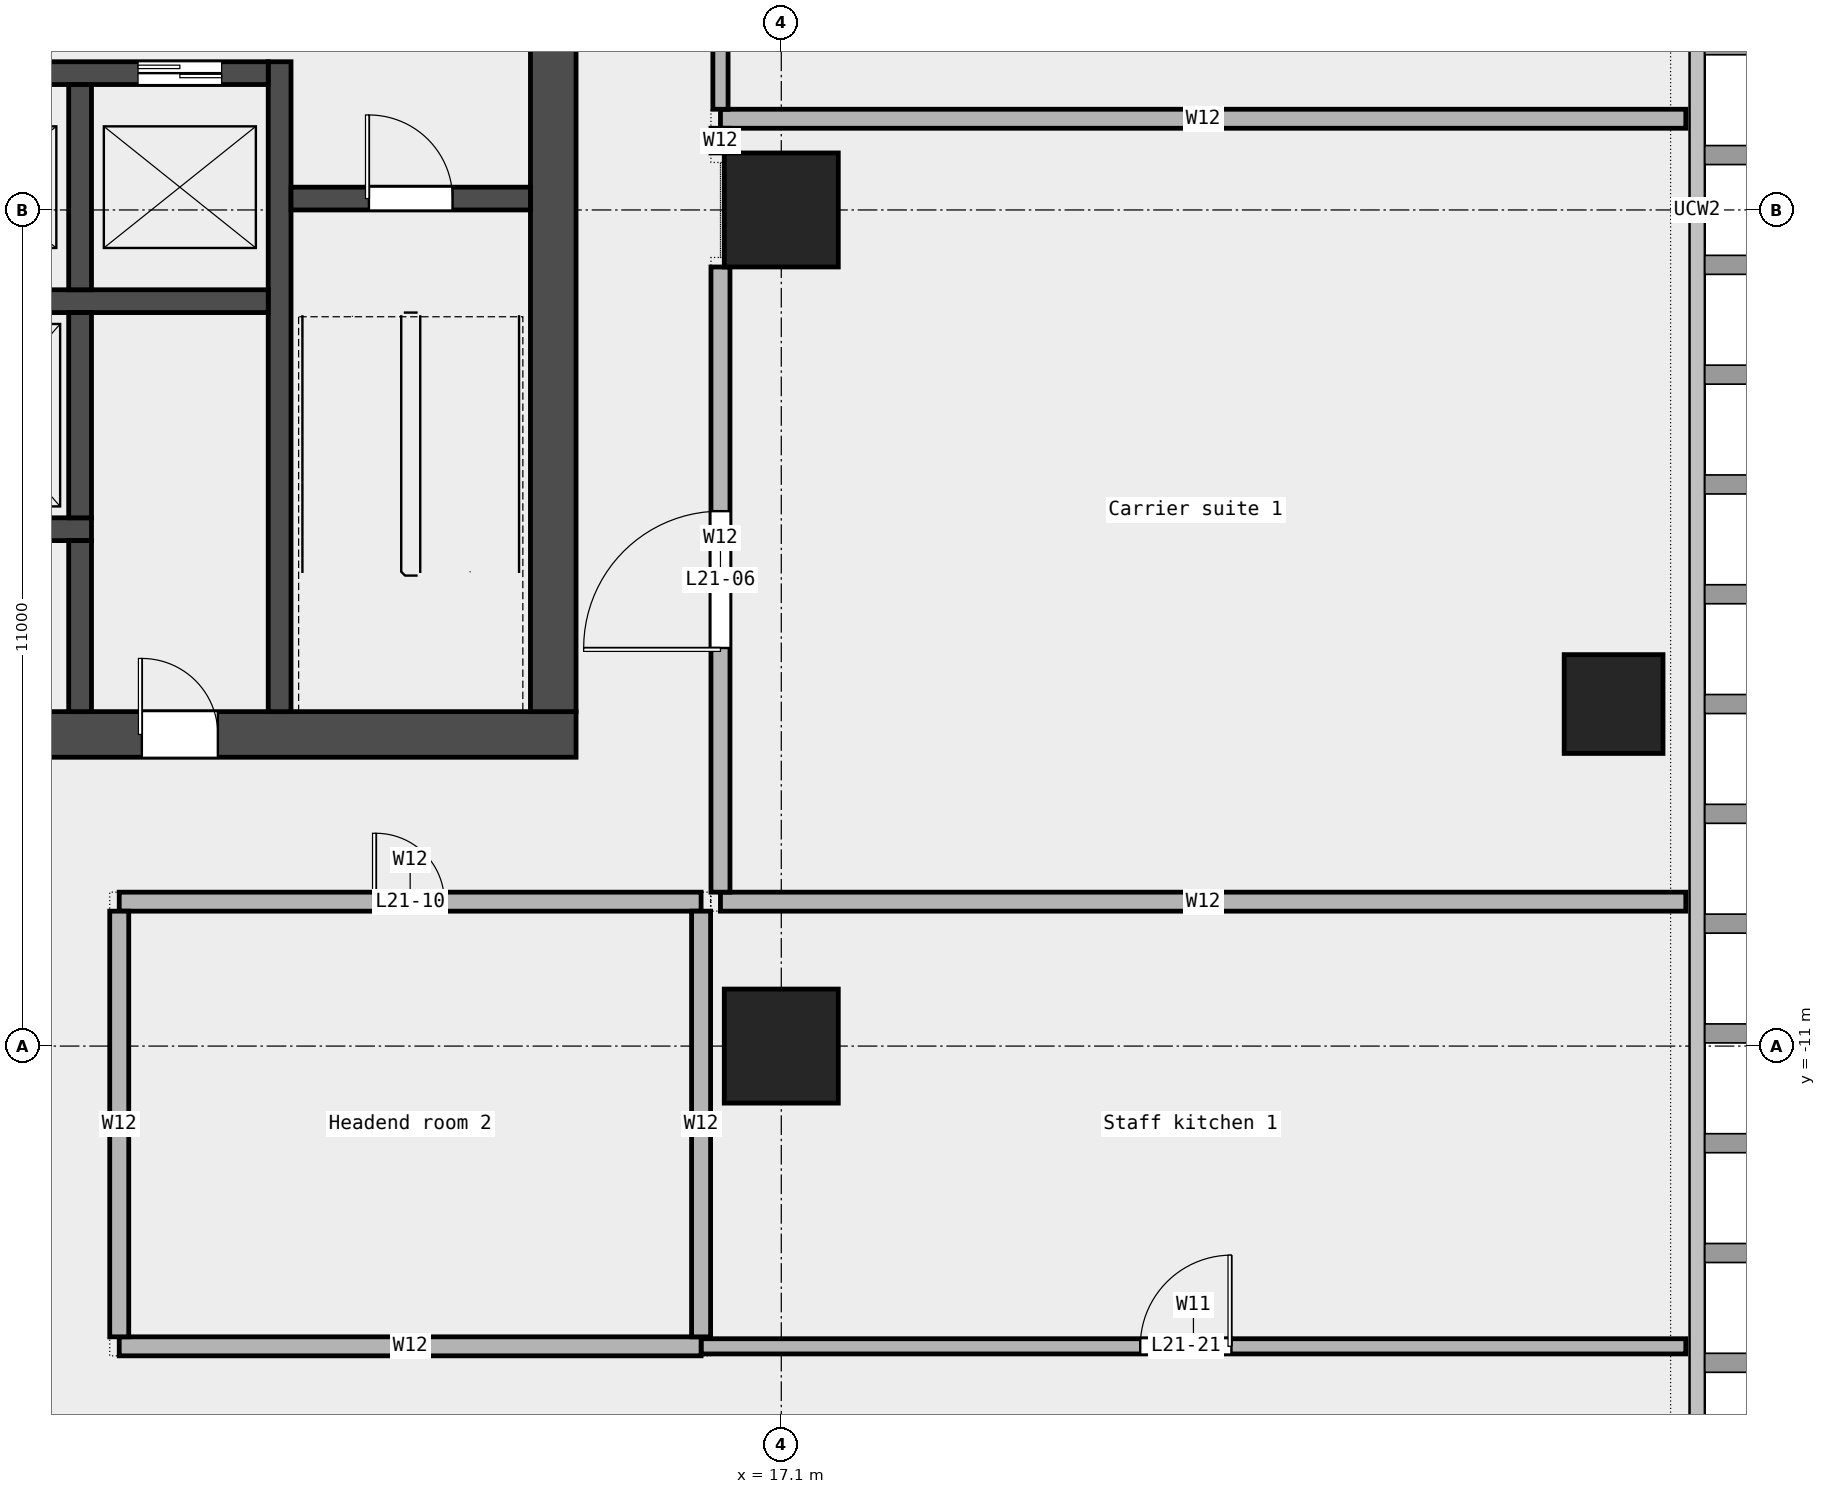
"""IFC4 building model, lengths in metres.
Left out: names, types, materials, properties, quantities, classifications, styles, units other than length and angle.
Written with IfcOpenShell. Run it as: python <this file> out.ifc"""

import sys

from ifc_helpers import new_model, si_unit, direction, frame, frame_2d, origin, origin_2d, place, context, subcontext, project, spatial, rectangle, extrude, element, fill, save


model = new_model("IFC4")
c1 = context("Model", 3, precision=1e-05, world=origin(), true_north=direction((0.0, 1.0)))
c2 = subcontext(c1, "Body", "Model", "MODEL_VIEW")
j1 = project(units=[si_unit("LENGTHUNIT", "METRE"), si_unit("PLANEANGLEUNIT", "RADIAN")], contexts=[c1])
p1 = place(None, origin())
s1 = spatial("IfcSite", under=j1, at=p1, CompositionType="ELEMENT")
p2 = place(p1, origin())
s2 = spatial("IfcBuilding", under=s1, at=p2, CompositionType="ELEMENT")
p3 = place(p2, frame((0.0, 0.0, 108.1)))
s3 = spatial("IfcBuildingStorey", under=s2, at=p3, CompositionType="ELEMENT", Elevation=108.1)
p4 = place(p3, frame((28.05, -6.5, 0.0), z_axis=(0.0, 0.0, 1.0), x_axis=(1.0, 0.0, 0.0)))
e1 = element("IfcColumn", 1, at=p4, inside=s3, PredefinedType="COLUMN", context=c2, shape_type="SweptSolid", body=[
    extrude(rectangle(XDim=1.3, YDim=1.3, at=origin_2d()), origin(), (0.0, 0.0, 1.0), 4.05),
])
for number, where, z_axis, x_axis in (
    (2, (17.1, -11.0, 0.0), (0.0, 0.0, 1.0), (1.0, 0.0, 0.0)),
    (3, (17.1, 0.0, 0.0), (0.0, 0.0, 1.0), (1.0, 0.0, 0.0)),
):
    element("IfcColumn", number, at=place(p3, frame(where, z_axis=z_axis, x_axis=x_axis)), inside=s3, PredefinedType="COLUMN", context=c2, shape_type="SweptSolid", body=[
        extrude(rectangle(XDim=1.5, YDim=1.5, at=origin_2d()), origin(), (0.0, 0.0, 1.0), 4.05),
    ])
p5 = place(p3, frame((16.045, -14.95, 0.0), z_axis=(0.0, 0.0, 1.0), x_axis=(1.0, 0.0, 0.0)))
e4 = element("IfcWall", 4, at=p5, inside=s3, PredefinedType="PARTITIONING", context=c2, shape_type="SweptSolid", body=[
    extrude(rectangle(XDim=12.955, YDim=0.2, at=frame_2d((6.478, 0.0))), origin(), (0.0, 0.0, 1.0), 4.05),
])
p6 = place(p5, frame((5.778, 0.0, 0.0)))
e5 = element("IfcOpeningElement", 5, at=p6, cuts=e4, PredefinedType="OPENING", context=c2, shape_type="SweptSolid", body=[
    extrude(rectangle(XDim=1.2, YDim=2.1, at=frame_2d((0.6, 1.05))), frame((0.0, 0.112, 0.0), z_axis=(0.0, -1.0, 0.0), x_axis=(1.0, 0.0, 0.0)), (0.0, 0.0, 1.0), 0.224),
])
p7 = place(p3, frame((8.39, -14.95, 0.0), z_axis=(0.0, 0.0, 1.0), x_axis=(1.0, 0.0, 0.0)))
e6 = element("IfcWall", 6, at=p7, inside=s3, PredefinedType="PARTITIONING", context=c2, shape_type="SweptSolid", body=[
    extrude(rectangle(XDim=7.655, YDim=0.25, at=frame_2d((3.828, 0.0))), origin(), (0.0, 0.0, 1.0), 4.05),
])
p8 = place(p3, frame((8.39, -9.1, 0.0), z_axis=(0.0, 0.0, 1.0), x_axis=(1.0, 0.0, 0.0)))
e7 = element("IfcWall", 7, at=p8, inside=s3, PredefinedType="PARTITIONING", context=c2, shape_type="SweptSolid", body=[
    extrude(rectangle(XDim=7.655, YDim=0.25, at=frame_2d((3.828, 0.0))), origin(), (0.0, 0.0, 1.0), 4.05),
])
p9 = place(p8, frame((3.377, 0.0, 0.0)))
e8 = element("IfcOpeningElement", 8, at=p9, cuts=e7, PredefinedType="OPENING", context=c2, shape_type="SweptSolid", body=[
    extrude(rectangle(XDim=0.9, YDim=2.1, at=frame_2d((0.45, 1.05))), frame((0.0, 0.137, 0.0), z_axis=(0.0, -1.0, 0.0), x_axis=(1.0, 0.0, 0.0)), (0.0, 0.0, 1.0), 0.274),
])
for number, where, z_axis, x_axis in (
    (9, (16.3, -9.1, 0.0), (0.0, 0.0, 1.0), (1.0, 0.0, 0.0)),
    (10, (16.3, 1.2, 0.0), (0.0, 0.0, 1.0), (1.0, 0.0, 0.0)),
):
    element("IfcWall", number, at=place(p3, frame(where, z_axis=z_axis, x_axis=x_axis)), inside=s3, PredefinedType="PARTITIONING", context=c2, shape_type="SweptSolid", body=[
        extrude(rectangle(XDim=12.7, YDim=0.25, at=frame_2d((6.35, 0.0))), origin(), (0.0, 0.0, 1.0), 4.05),
    ])
for number, where, z_axis, x_axis in (
    (11, (8.39, -14.825, 0.0), (0.0, 0.0, 1.0), (0.0, 1.0, 0.0)),
    (12, (16.045, -14.825, 0.0), (0.0, 0.0, 1.0), (0.0, 1.0, 0.0)),
):
    element("IfcWall", number, at=place(p3, frame(where, z_axis=z_axis, x_axis=x_axis)), inside=s3, PredefinedType="PARTITIONING", context=c2, shape_type="SweptSolid", body=[
        extrude(rectangle(XDim=5.6, YDim=0.25, at=frame_2d((2.8, 0.0))), origin(), (0.0, 0.0, 1.0), 4.05),
    ])
p10 = place(p3, frame((16.3, 1.325, 0.0), z_axis=(0.0, 0.0, 1.0), x_axis=(0.0, 1.0, 0.0)))
e13 = element("IfcWall", 13, at=p10, inside=s3, PredefinedType="PARTITIONING", context=c2, shape_type="SweptSolid", body=[
    extrude(rectangle(XDim=8.925, YDim=0.2, at=frame_2d((4.462, 0.0))), origin(), (0.0, 0.0, 1.0), 4.05),
])
p11 = place(p10, frame((3.188, 0.0, 0.0)))
e14 = element("IfcOpeningElement", 14, at=p11, cuts=e13, PredefinedType="OPENING", context=c2, shape_type="SweptSolid", body=[
    extrude(rectangle(XDim=1.8, YDim=2.1, at=frame_2d((0.9, 1.05))), frame((0.0, 0.112, 0.0), z_axis=(0.0, -1.0, 0.0), x_axis=(1.0, 0.0, 0.0)), (0.0, 0.0, 1.0), 0.224),
])
p12 = place(p3, frame((16.3, -8.975, 0.0), z_axis=(0.0, 0.0, 1.0), x_axis=(0.0, 1.0, 0.0)))
e15 = element("IfcWall", 15, at=p12, inside=s3, PredefinedType="PARTITIONING", context=c2, shape_type="SweptSolid", body=[
    extrude(rectangle(XDim=8.225, YDim=0.25, at=frame_2d((4.113, 0.0))), origin(), (0.0, 0.0, 1.0), 4.05),
])
p13 = place(p12, frame((3.212, 0.0, 0.0)))
e16 = element("IfcOpeningElement", 16, at=p13, cuts=e15, PredefinedType="OPENING", context=c2, shape_type="SweptSolid", body=[
    extrude(rectangle(XDim=1.8, YDim=2.1, at=frame_2d((0.9, 1.05))), frame((0.0, 0.137, 0.0), z_axis=(0.0, -1.0, 0.0), x_axis=(1.0, 0.0, 0.0)), (0.0, 0.0, 1.0), 0.274),
])
p14 = place(p3, frame((16.3, 0.75, 0.0), z_axis=(0.0, 0.0, 1.0), x_axis=(0.0, 1.0, 0.0)))
e17 = element("IfcWall", 17, at=p14, inside=s3, PredefinedType="PARTITIONING", context=c2, shape_type="SweptSolid", body=[
    extrude(rectangle(XDim=0.325, YDim=0.25, at=frame_2d((0.163, 0.0))), origin(), (0.0, 0.0, 1.0), 4.05),
])
p15 = place(p3, frame((-14.4, -6.9, 0.0), z_axis=(0.0, 0.0, 1.0), x_axis=(1.0, 0.0, 0.0)))
e18 = element("IfcWall", 18, at=p15, inside=s3, PredefinedType="SHEAR", context=c2, shape_type="SweptSolid", body=[
    extrude(rectangle(XDim=28.8, YDim=0.6, at=frame_2d((14.4, 0.0))), origin(), (0.0, 0.0, 1.0), 4.2),
])
p16 = place(p15, frame((7.05, 0.0, 0.0)))
e19 = element("IfcOpeningElement", 19, at=p16, cuts=e18, PredefinedType="OPENING", context=c2, shape_type="SweptSolid", body=[
    extrude(rectangle(XDim=1.2, YDim=2.1, at=frame_2d((0.6, 1.05))), frame((0.0, 0.312, 0.0), z_axis=(0.0, -1.0, 0.0), x_axis=(1.0, 0.0, 0.0)), (0.0, 0.0, 1.0), 0.624),
])
p17 = place(p15, frame((11.837, 0.0, 0.0)))
e20 = element("IfcOpeningElement", 20, at=p17, cuts=e18, PredefinedType="OPENING", context=c2, shape_type="SweptSolid", body=[
    extrude(rectangle(XDim=1.0, YDim=2.1, at=frame_2d((0.5, 1.05))), frame((0.0, 0.312, 0.0), z_axis=(0.0, -1.0, 0.0), x_axis=(1.0, 0.0, 0.0)), (0.0, 0.0, 1.0), 0.624),
])
p18 = place(p15, frame((13.712, 0.0, 0.0)))
e21 = element("IfcOpeningElement", 21, at=p18, cuts=e18, PredefinedType="OPENING", context=c2, shape_type="SweptSolid", body=[
    extrude(rectangle(XDim=1.0, YDim=2.1, at=frame_2d((0.5, 1.05))), frame((0.0, 0.312, 0.0), z_axis=(0.0, -1.0, 0.0), x_axis=(1.0, 0.0, 0.0)), (0.0, 0.0, 1.0), 0.624),
])
p19 = place(p15, frame((15.587, 0.0, 0.0)))
e22 = element("IfcOpeningElement", 22, at=p19, cuts=e18, PredefinedType="OPENING", context=c2, shape_type="SweptSolid", body=[
    extrude(rectangle(XDim=1.0, YDim=2.1, at=frame_2d((0.5, 1.05))), frame((0.0, 0.312, 0.0), z_axis=(0.0, -1.0, 0.0), x_axis=(1.0, 0.0, 0.0)), (0.0, 0.0, 1.0), 0.624),
])
p20 = place(p15, frame((18.75, 0.0, 0.0)))
e23 = element("IfcOpeningElement", 23, at=p20, cuts=e18, PredefinedType="OPENING", context=c2, shape_type="SweptSolid", body=[
    extrude(rectangle(XDim=1.8, YDim=2.1, at=frame_2d((0.9, 1.05))), frame((0.0, 0.312, 0.0), z_axis=(0.0, -1.0, 0.0), x_axis=(1.0, 0.0, 0.0)), (0.0, 0.0, 1.0), 0.624),
])
p21 = place(p15, frame((23.087, 0.0, 0.0)))
e24 = element("IfcOpeningElement", 24, at=p21, cuts=e18, PredefinedType="OPENING", context=c2, shape_type="SweptSolid", body=[
    extrude(rectangle(XDim=1.0, YDim=2.1, at=frame_2d((0.5, 1.05))), frame((0.0, 0.312, 0.0), z_axis=(0.0, -1.0, 0.0), x_axis=(1.0, 0.0, 0.0)), (0.0, 0.0, 1.0), 0.624),
])
p22 = place(p3, frame((14.1, -6.6, 0.0), z_axis=(0.0, 0.0, 1.0), x_axis=(0.0, 1.0, 0.0)))
e25 = element("IfcWall", 25, at=p22, inside=s3, PredefinedType="SHEAR", context=c2, shape_type="SweptSolid", body=[
    extrude(rectangle(XDim=19.5, YDim=0.6, at=frame_2d((9.75, 0.0))), origin(), (0.0, 0.0, 1.0), 4.2),
])
p23 = place(p22, frame((9.3, 0.0, 0.0)))
e26 = element("IfcOpeningElement", 26, at=p23, cuts=e25, PredefinedType="OPENING", context=c2, shape_type="SweptSolid", body=[
    extrude(rectangle(XDim=1.8, YDim=2.1, at=frame_2d((0.9, 1.05))), frame((0.0, 0.312, 0.0), z_axis=(0.0, -1.0, 0.0), x_axis=(1.0, 0.0, 0.0)), (0.0, 0.0, 1.0), 0.624),
])
p24 = place(p3, frame((10.5, -6.6, 0.0), z_axis=(0.0, 0.0, 1.0), x_axis=(0.0, 1.0, 0.0)))
e27 = element("IfcWall", 27, at=p24, inside=s3, PredefinedType="SHEAR", context=c2, shape_type="SweptSolid", body=[
    extrude(rectangle(XDim=8.55, YDim=0.3, at=frame_2d((4.275, 0.0))), origin(), (0.0, 0.0, 1.0), 4.2),
])
p25 = place(p3, frame((10.65, 0.15, 0.0), z_axis=(0.0, 0.0, 1.0), x_axis=(1.0, 0.0, 0.0)))
e28 = element("IfcWall", 28, at=p25, inside=s3, PredefinedType="SOLIDWALL", context=c2, shape_type="SweptSolid", body=[
    extrude(rectangle(XDim=3.15, YDim=0.3, at=frame_2d((1.575, 0.0))), origin(), (0.0, 0.0, 1.0), 4.2),
])
p26 = place(p25, frame((1.025, 0.0, 0.0)))
e29 = element("IfcOpeningElement", 29, at=p26, cuts=e28, PredefinedType="OPENING", context=c2, shape_type="SweptSolid", body=[
    extrude(rectangle(XDim=1.1, YDim=2.1, at=frame_2d((0.55, 1.05))), frame((0.0, 0.162, 0.0), z_axis=(0.0, -1.0, 0.0), x_axis=(1.0, 0.0, 0.0)), (0.0, 0.0, 1.0), 0.324),
])
p27 = place(p3, frame((-10.35, -1.2, 0.0), z_axis=(0.0, 0.0, 1.0), x_axis=(1.0, 0.0, 0.0)))
e30 = element("IfcWall", 30, at=p27, inside=s3, PredefinedType="SOLIDWALL", context=c2, shape_type="SweptSolid", body=[
    extrude(rectangle(XDim=20.7, YDim=0.3, at=frame_2d((10.35, 0.0))), origin(), (0.0, 0.0, 1.0), 4.2),
])
p28 = place(p3, frame((-10.35, 1.8, 0.0), z_axis=(0.0, 0.0, 1.0), x_axis=(1.0, 0.0, 0.0)))
e31 = element("IfcWall", 31, at=p28, inside=s3, PredefinedType="SOLIDWALL", context=c2, shape_type="SweptSolid", body=[
    extrude(rectangle(XDim=20.7, YDim=0.3, at=frame_2d((10.35, 0.0))), origin(), (0.0, 0.0, 1.0), 4.2),
])
p29 = place(p28, frame((0.512, 0.0, 0.0)))
e32 = element("IfcOpeningElement", 32, at=p29, cuts=e31, PredefinedType="OPENING", context=c2, shape_type="SweptSolid", body=[
    extrude(rectangle(XDim=1.3, YDim=2.1, at=frame_2d((0.65, 1.05))), frame((0.0, 0.162, 0.0), z_axis=(0.0, -1.0, 0.0), x_axis=(1.0, 0.0, 0.0)), (0.0, 0.0, 1.0), 0.324),
])
p30 = place(p28, frame((5.863, 0.0, 0.0)))
e33 = element("IfcOpeningElement", 33, at=p30, cuts=e31, PredefinedType="OPENING", context=c2, shape_type="SweptSolid", body=[
    extrude(rectangle(XDim=1.1, YDim=2.1, at=frame_2d((0.55, 1.05))), frame((0.0, 0.162, 0.0), z_axis=(0.0, -1.0, 0.0), x_axis=(1.0, 0.0, 0.0)), (0.0, 0.0, 1.0), 0.324),
])
p31 = place(p28, frame((8.488, 0.0, 0.0)))
e34 = element("IfcOpeningElement", 34, at=p31, cuts=e31, PredefinedType="OPENING", context=c2, shape_type="SweptSolid", body=[
    extrude(rectangle(XDim=1.1, YDim=2.1, at=frame_2d((0.55, 1.05))), frame((0.0, 0.162, 0.0), z_axis=(0.0, -1.0, 0.0), x_axis=(1.0, 0.0, 0.0)), (0.0, 0.0, 1.0), 0.324),
])
p32 = place(p28, frame((11.113, 0.0, 0.0)))
e35 = element("IfcOpeningElement", 35, at=p32, cuts=e31, PredefinedType="OPENING", context=c2, shape_type="SweptSolid", body=[
    extrude(rectangle(XDim=1.1, YDim=2.1, at=frame_2d((0.55, 1.05))), frame((0.0, 0.162, 0.0), z_axis=(0.0, -1.0, 0.0), x_axis=(1.0, 0.0, 0.0)), (0.0, 0.0, 1.0), 0.324),
])
p33 = place(p28, frame((13.738, 0.0, 0.0)))
e36 = element("IfcOpeningElement", 36, at=p33, cuts=e31, PredefinedType="OPENING", context=c2, shape_type="SweptSolid", body=[
    extrude(rectangle(XDim=1.1, YDim=2.1, at=frame_2d((0.55, 1.05))), frame((0.0, 0.162, 0.0), z_axis=(0.0, -1.0, 0.0), x_axis=(1.0, 0.0, 0.0)), (0.0, 0.0, 1.0), 0.324),
])
p34 = place(p28, frame((16.363, 0.0, 0.0)))
e37 = element("IfcOpeningElement", 37, at=p34, cuts=e31, PredefinedType="OPENING", context=c2, shape_type="SweptSolid", body=[
    extrude(rectangle(XDim=1.1, YDim=2.1, at=frame_2d((0.55, 1.05))), frame((0.0, 0.162, 0.0), z_axis=(0.0, -1.0, 0.0), x_axis=(1.0, 0.0, 0.0)), (0.0, 0.0, 1.0), 0.324),
])
p35 = place(p28, frame((18.988, 0.0, 0.0)))
e38 = element("IfcOpeningElement", 38, at=p35, cuts=e31, PredefinedType="OPENING", context=c2, shape_type="SweptSolid", body=[
    extrude(rectangle(XDim=1.1, YDim=2.1, at=frame_2d((0.55, 1.05))), frame((0.0, 0.162, 0.0), z_axis=(0.0, -1.0, 0.0), x_axis=(1.0, 0.0, 0.0)), (0.0, 0.0, 1.0), 0.324),
])
p36 = place(p3, frame((7.875, -1.05, 0.0), z_axis=(0.0, 0.0, 1.0), x_axis=(0.0, 1.0, 0.0)))
e39 = element("IfcWall", 39, at=p36, inside=s3, PredefinedType="SOLIDWALL", context=c2, shape_type="SweptSolid", body=[
    extrude(rectangle(XDim=2.7, YDim=0.3, at=frame_2d((1.35, 0.0))), origin(), (0.0, 0.0, 1.0), 4.2),
])
p37 = place(p3, frame((2.475, -4.2, 0.0), z_axis=(0.0, 0.0, 1.0), x_axis=(1.0, 0.0, 0.0)))
e40 = element("IfcWall", 40, at=p37, inside=s3, PredefinedType="SOLIDWALL", context=c2, shape_type="SweptSolid", body=[
    extrude(rectangle(XDim=5.55, YDim=0.3, at=frame_2d((2.775, 0.0))), origin(), (0.0, 0.0, 1.0), 4.2),
])
p38 = place(p37, frame((0.762, 0.0, 0.0)))
e41 = element("IfcOpeningElement", 41, at=p38, cuts=e40, PredefinedType="OPENING", context=c2, shape_type="SweptSolid", body=[
    extrude(rectangle(XDim=1.4, YDim=2.1, at=frame_2d((0.7, 1.05))), frame((0.0, 0.162, 0.0), z_axis=(0.0, -1.0, 0.0), x_axis=(1.0, 0.0, 0.0)), (0.0, 0.0, 1.0), 0.324),
])
p39 = place(p37, frame((3.387, 0.0, 0.0)))
e42 = element("IfcOpeningElement", 42, at=p39, cuts=e40, PredefinedType="OPENING", context=c2, shape_type="SweptSolid", body=[
    extrude(rectangle(XDim=1.4, YDim=2.1, at=frame_2d((0.7, 1.05))), frame((0.0, 0.162, 0.0), z_axis=(0.0, -1.0, 0.0), x_axis=(1.0, 0.0, 0.0)), (0.0, 0.0, 1.0), 0.324),
])
p40 = place(p3, frame((7.875, -4.05, 0.0), z_axis=(0.0, 0.0, 1.0), x_axis=(0.0, 1.0, 0.0)))
e43 = element("IfcWall", 43, at=p40, inside=s3, PredefinedType="SOLIDWALL", context=c2, shape_type="SweptSolid", body=[
    extrude(rectangle(XDim=2.7, YDim=0.3, at=frame_2d((1.35, 0.0))), origin(), (0.0, 0.0, 1.0), 4.2),
])
p41 = place(p3, frame((7.875, -6.6, 0.0), z_axis=(0.0, 0.0, 1.0), x_axis=(0.0, 1.0, 0.0)))
e44 = element("IfcWall", 44, at=p41, inside=s3, PredefinedType="SOLIDWALL", context=c2, shape_type="SweptSolid", body=[
    extrude(rectangle(XDim=2.25, YDim=0.3, at=frame_2d((1.125, 0.0))), origin(), (0.0, 0.0, 1.0), 4.2),
])
p42 = place(p13, origin())
e45 = element("IfcDoor", 45, at=p42, inside=s3, OperationType="DOUBLE_DOOR_SINGLE_SWING", PredefinedType="DOOR", context=c2, shape_type="SweptSolid", body=[
    extrude(rectangle(XDim=1.8, YDim=2.1, at=frame_2d((0.9, 1.05))), frame((0.0, 0.025, 0.0), z_axis=(0.0, -1.0, 0.0), x_axis=(1.0, 0.0, 0.0)), (0.0, 0.0, 1.0), 0.05),
])
fill(e16, e45)
p43 = place(p9, origin())
e46 = element("IfcDoor", 46, at=p43, inside=s3, OperationType="SINGLE_SWING_LEFT", PredefinedType="DOOR", context=c2, shape_type="SweptSolid", body=[
    extrude(rectangle(XDim=0.9, YDim=2.1, at=frame_2d((0.45, 1.05))), frame((0.0, 0.025, 0.0), z_axis=(0.0, -1.0, 0.0), x_axis=(1.0, 0.0, 0.0)), (0.0, 0.0, 1.0), 0.05),
])
fill(e8, e46)
p44 = place(p6, origin())
e47 = element("IfcDoor", 47, at=p44, inside=s3, OperationType="SINGLE_SWING_RIGHT", PredefinedType="DOOR", context=c2, shape_type="SweptSolid", body=[
    extrude(rectangle(XDim=1.2, YDim=2.1, at=frame_2d((0.6, 1.05))), frame((0.0, 0.025, 0.0), z_axis=(0.0, -1.0, 0.0), x_axis=(1.0, 0.0, 0.0)), (0.0, 0.0, 1.0), 0.05),
])
fill(e5, e47)
p45 = place(p26, origin())
e48 = element("IfcDoor", 48, at=p45, inside=s3, OperationType="SINGLE_SWING_RIGHT", PredefinedType="DOOR", context=c2, shape_type="SweptSolid", body=[
    extrude(rectangle(XDim=1.1, YDim=2.1, at=frame_2d((0.55, 1.05))), frame((0.0, 0.025, 0.0), z_axis=(0.0, -1.0, 0.0), x_axis=(1.0, 0.0, 0.0)), (0.0, 0.0, 1.0), 0.05),
])
fill(e29, e48)
p46 = place(p35, origin())
e49 = element("IfcDoor", 49, at=p46, inside=s3, OperationType="DOUBLE_DOOR_SLIDING", PredefinedType="DOOR", context=c2, shape_type="SweptSolid", body=[
    extrude(rectangle(XDim=1.1, YDim=2.1, at=frame_2d((0.55, 1.05))), frame((0.0, 0.025, 0.0), z_axis=(0.0, -1.0, 0.0), x_axis=(1.0, 0.0, 0.0)), (0.0, 0.0, 1.0), 0.05),
])
fill(e38, e49)
p47 = place(p21, origin())
e50 = element("IfcDoor", 50, at=p47, inside=s3, OperationType="SINGLE_SWING_LEFT", PredefinedType="DOOR", context=c2, shape_type="SweptSolid", body=[
    extrude(rectangle(XDim=1.0, YDim=2.1, at=frame_2d((0.5, 1.05))), frame((0.0, 0.025, 0.0), z_axis=(0.0, -1.0, 0.0), x_axis=(1.0, 0.0, 0.0)), (0.0, 0.0, 1.0), 0.05),
])
fill(e24, e50)
save(model, sys.argv[1])
